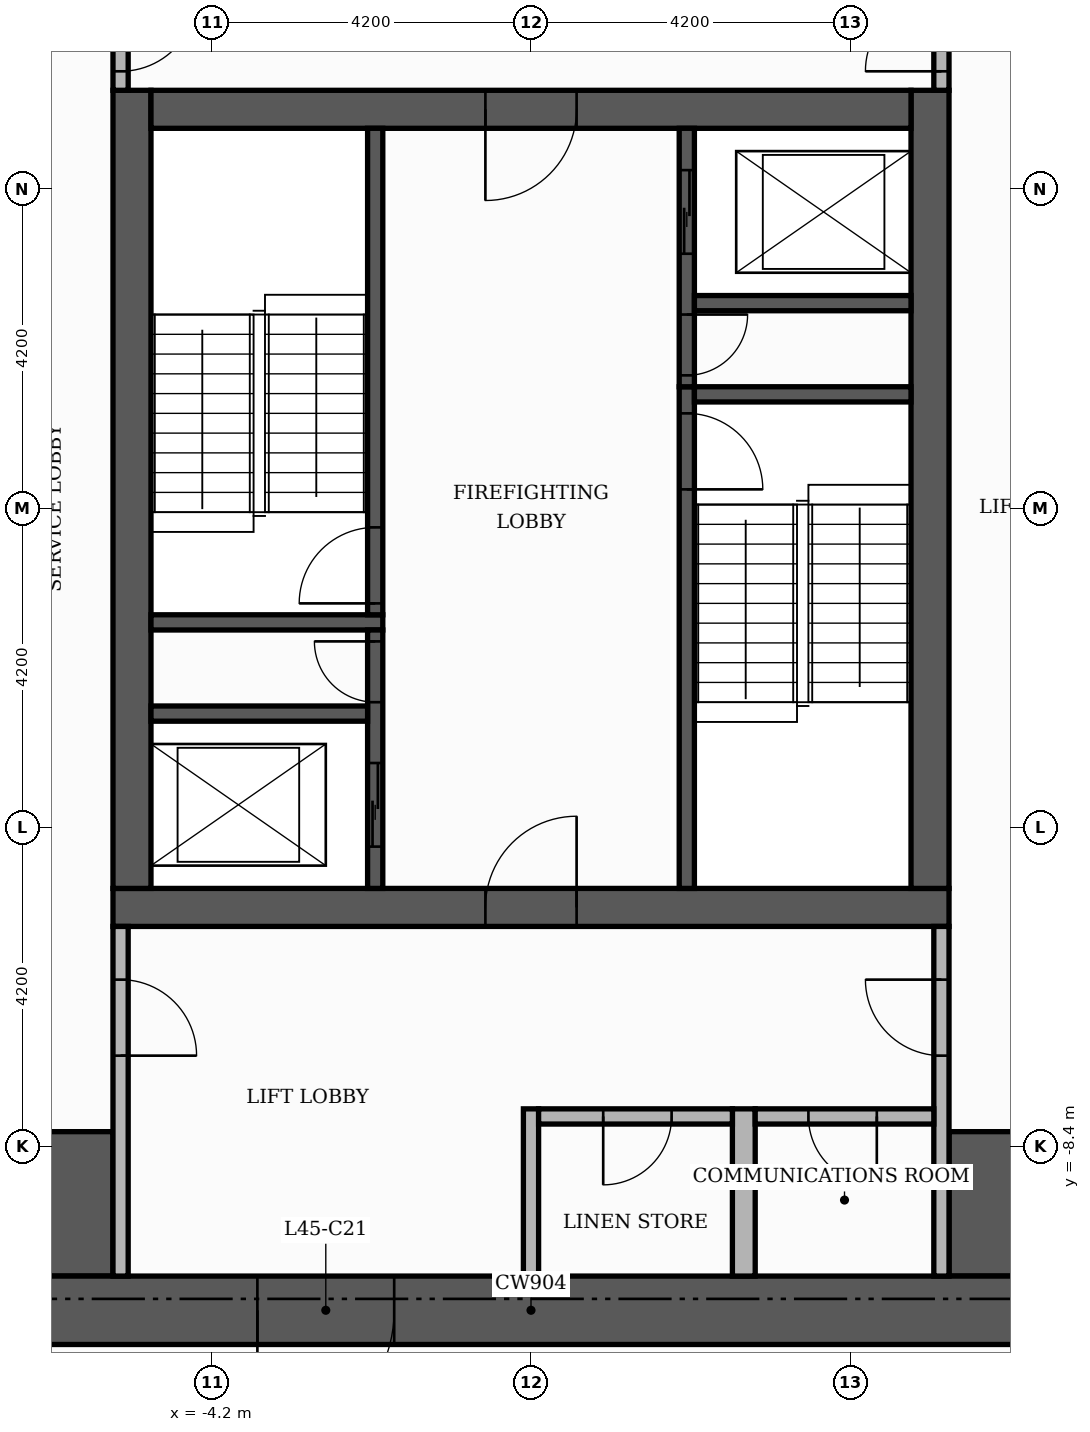
"""IFC4 building model, lengths in metres.
Left out: names, types, materials, properties, quantities, classifications, styles, units other than length and angle.
Written with IfcOpenShell. Run it as: python <this file> out.ifc"""

import sys

from ifc_helpers import new_model, si_unit, direction, frame, frame_2d, origin, place, context, subcontext, project, spatial, rectangle, extrude, element, fill, save


model = new_model("IFC4")
c1 = context("Model", 3, precision=1e-05, world=origin(), true_north=direction((0.0, 1.0)))
c2 = subcontext(c1, "Body", "Model", "MODEL_VIEW")
j1 = project(units=[si_unit("LENGTHUNIT", "METRE"), si_unit("PLANEANGLEUNIT", "RADIAN")], contexts=[c1])
p1 = place(None, origin())
s1 = spatial("IfcSite", under=j1, at=p1, CompositionType="ELEMENT")
p2 = place(p1, origin())
s2 = spatial("IfcBuilding", under=s1, at=p2, CompositionType="ELEMENT")
p3 = place(p2, frame((0.0, 0.0, 192.3)))
s3 = spatial("IfcBuildingStorey", under=s2, at=p3, CompositionType="ELEMENT", Elevation=192.3)
p4 = place(p3, frame((-5.5, -5.25, 0.0), z_axis=(0.0, 0.0, 1.0), x_axis=(1.0, 0.0, 0.0)))
e1 = element("IfcWall", 1, at=p4, inside=s3, PredefinedType="SHEAR", context=c2, shape_type="SweptSolid", body=[
    extrude(rectangle(XDim=11.0, YDim=0.5, at=frame_2d((5.5, 0.0))), origin(), (0.0, 0.0, 1.0), 3.48),
])
p5 = place(p4, frame((4.9, 0.0, 0.0)))
e2 = element("IfcOpeningElement", 2, at=p5, cuts=e1, PredefinedType="OPENING", context=c2, shape_type="SweptSolid", body=[
    extrude(rectangle(XDim=1.2, YDim=2.1, at=frame_2d((0.6, 1.05))), frame((0.0, 0.26, 0.0), z_axis=(0.0, -1.0, 0.0), x_axis=(1.0, 0.0, 0.0)), (0.0, 0.0, 1.0), 0.52),
])
for number, where, z_axis, x_axis in (
    (3, (-5.25, -5.0, 0.0), (0.0, 0.0, 1.0), (0.0, 1.0, 0.0)),
    (4, (5.25, -5.0, 0.0), (0.0, 0.0, 1.0), (0.0, 1.0, 0.0)),
):
    element("IfcWall", number, at=place(p3, frame(where, z_axis=z_axis, x_axis=x_axis)), inside=s3, PredefinedType="SHEAR", context=c2, shape_type="SweptSolid", body=[
        extrude(rectangle(XDim=10.5, YDim=0.5, at=frame_2d((5.25, 0.0))), origin(), (0.0, 0.0, 1.0), 3.48),
    ])
p6 = place(p3, frame((-5.0, 5.25, 0.0), z_axis=(0.0, 0.0, 1.0), x_axis=(1.0, 0.0, 0.0)))
e5 = element("IfcWall", 5, at=p6, inside=s3, PredefinedType="SHEAR", context=c2, shape_type="SweptSolid", body=[
    extrude(rectangle(XDim=10.0, YDim=0.5, at=frame_2d((5.0, 0.0))), origin(), (0.0, 0.0, 1.0), 3.48),
])
p7 = place(p6, frame((4.4, 0.0, 0.0)))
e6 = element("IfcOpeningElement", 6, at=p7, cuts=e5, PredefinedType="OPENING", context=c2, shape_type="SweptSolid", body=[
    extrude(rectangle(XDim=1.2, YDim=2.1, at=frame_2d((0.6, 1.05))), frame((0.0, 0.26, 0.0), z_axis=(0.0, -1.0, 0.0), x_axis=(1.0, 0.0, 0.0)), (0.0, 0.0, 1.0), 0.52),
])
for number, where, z_axis, x_axis in (
    (7, (-10.1, -9.15, 0.0), (0.0, 0.0, 1.0), (1.0, 0.0, 0.0)),
    (8, (5.5, -9.15, 0.0), (0.0, 0.0, 1.0), (1.0, 0.0, 0.0)),
):
    element("IfcWall", number, at=place(p3, frame(where, z_axis=z_axis, x_axis=x_axis)), inside=s3, PredefinedType="SHEAR", context=c2, shape_type="SweptSolid", body=[
        extrude(rectangle(XDim=4.6, YDim=1.9, at=frame_2d((2.3, 0.0))), origin(), (0.0, 0.0, 1.0), 3.48),
    ])
p8 = place(p3, frame((2.05, -5.0, 0.0), z_axis=(0.0, 0.0, 1.0), x_axis=(0.0, 1.0, 0.0)))
e9 = element("IfcWall", 9, at=p8, inside=s3, PredefinedType="SHEAR", context=c2, shape_type="SweptSolid", body=[
    extrude(rectangle(XDim=6.6, YDim=0.2, at=frame_2d((3.3, 0.0))), origin(), (0.0, 0.0, 1.0), 3.48),
])
p9 = place(p8, frame((5.25, 0.0, 0.0)))
e10 = element("IfcOpeningElement", 10, at=p9, cuts=e9, PredefinedType="OPENING", context=c2, shape_type="SweptSolid", body=[
    extrude(rectangle(XDim=1.0, YDim=2.1, at=frame_2d((0.5, 1.05))), frame((0.0, 0.11, 0.0), z_axis=(0.0, -1.0, 0.0), x_axis=(1.0, 0.0, 0.0)), (0.0, 0.0, 1.0), 0.22),
])
p10 = place(p3, frame((-5.0, -1.5, 0.0), z_axis=(0.0, 0.0, 1.0), x_axis=(1.0, 0.0, 0.0)))
e11 = element("IfcWall", 11, at=p10, inside=s3, PredefinedType="SHEAR", context=c2, shape_type="SweptSolid", body=[
    extrude(rectangle(XDim=3.05, YDim=0.2, at=frame_2d((1.525, 0.0))), origin(), (0.0, 0.0, 1.0), 3.48),
])
p11 = place(p3, frame((-2.05, -1.4, 0.0), z_axis=(0.0, 0.0, 1.0), x_axis=(0.0, 1.0, 0.0)))
e12 = element("IfcWall", 12, at=p11, inside=s3, PredefinedType="SHEAR", context=c2, shape_type="SweptSolid", body=[
    extrude(rectangle(XDim=6.4, YDim=0.2, at=frame_2d((3.2, 0.0))), origin(), (0.0, 0.0, 1.0), 3.48),
])
p12 = place(p11, frame((0.15, 0.0, 0.0)))
e13 = element("IfcOpeningElement", 13, at=p12, cuts=e12, PredefinedType="OPENING", context=c2, shape_type="SweptSolid", body=[
    extrude(rectangle(XDim=1.0, YDim=2.1, at=frame_2d((0.5, 1.05))), frame((0.0, 0.11, 0.0), z_axis=(0.0, -1.0, 0.0), x_axis=(1.0, 0.0, 0.0)), (0.0, 0.0, 1.0), 0.22),
])
p13 = place(p3, frame((2.15, 1.5, 0.0), z_axis=(0.0, 0.0, 1.0), x_axis=(1.0, 0.0, 0.0)))
e14 = element("IfcWall", 14, at=p13, inside=s3, PredefinedType="SHEAR", context=c2, shape_type="SweptSolid", body=[
    extrude(rectangle(XDim=2.85, YDim=0.2, at=frame_2d((1.425, 0.0))), origin(), (0.0, 0.0, 1.0), 3.48),
])
p14 = place(p3, frame((-2.05, -5.0, 0.0), z_axis=(0.0, 0.0, 1.0), x_axis=(0.0, 1.0, 0.0)))
e15 = element("IfcWall", 15, at=p14, inside=s3, PredefinedType="SHEAR", context=c2, shape_type="SweptSolid", body=[
    extrude(rectangle(XDim=3.4, YDim=0.2, at=frame_2d((1.7, 0.0))), origin(), (0.0, 0.0, 1.0), 3.48),
])
p15 = place(p14, frame((0.55, 0.0, 0.0)))
e16 = element("IfcOpeningElement", 16, at=p15, cuts=e15, PredefinedType="OPENING", context=c2, shape_type="SweptSolid", body=[
    extrude(rectangle(XDim=1.1, YDim=2.1, at=frame_2d((0.55, 1.05))), frame((0.0, 0.11, 0.0), z_axis=(0.0, -1.0, 0.0), x_axis=(1.0, 0.0, 0.0)), (0.0, 0.0, 1.0), 0.22),
])
p16 = place(p14, frame((2.45, 0.0, 0.0)))
e17 = element("IfcOpeningElement", 17, at=p16, cuts=e15, PredefinedType="OPENING", context=c2, shape_type="SweptSolid", body=[
    extrude(rectangle(XDim=0.8, YDim=2.1, at=frame_2d((0.4, 1.05))), frame((0.0, 0.11, 0.0), z_axis=(0.0, -1.0, 0.0), x_axis=(1.0, 0.0, 0.0)), (0.0, 0.0, 1.0), 0.22),
])
p17 = place(p3, frame((-5.0, -2.7, 0.0), z_axis=(0.0, 0.0, 1.0), x_axis=(1.0, 0.0, 0.0)))
e18 = element("IfcWall", 18, at=p17, inside=s3, PredefinedType="SHEAR", context=c2, shape_type="SweptSolid", body=[
    extrude(rectangle(XDim=2.85, YDim=0.2, at=frame_2d((1.425, 0.0))), origin(), (0.0, 0.0, 1.0), 3.48),
])
p18 = place(p3, frame((2.05, 1.6, 0.0), z_axis=(0.0, 0.0, 1.0), x_axis=(0.0, 1.0, 0.0)))
e19 = element("IfcWall", 19, at=p18, inside=s3, PredefinedType="SHEAR", context=c2, shape_type="SweptSolid", body=[
    extrude(rectangle(XDim=3.4, YDim=0.2, at=frame_2d((1.7, 0.0))), origin(), (0.0, 0.0, 1.0), 3.48),
])
p19 = place(p18, frame((1.75, 0.0, 0.0)))
e20 = element("IfcOpeningElement", 20, at=p19, cuts=e19, PredefinedType="OPENING", context=c2, shape_type="SweptSolid", body=[
    extrude(rectangle(XDim=1.1, YDim=2.1, at=frame_2d((0.55, 1.05))), frame((0.0, 0.11, 0.0), z_axis=(0.0, -1.0, 0.0), x_axis=(1.0, 0.0, 0.0)), (0.0, 0.0, 1.0), 0.22),
])
p20 = place(p18, frame((0.15, 0.0, 0.0)))
e21 = element("IfcOpeningElement", 21, at=p20, cuts=e19, PredefinedType="OPENING", context=c2, shape_type="SweptSolid", body=[
    extrude(rectangle(XDim=0.8, YDim=2.1, at=frame_2d((0.4, 1.05))), frame((0.0, 0.11, 0.0), z_axis=(0.0, -1.0, 0.0), x_axis=(1.0, 0.0, 0.0)), (0.0, 0.0, 1.0), 0.22),
])
p21 = place(p3, frame((2.15, 2.7, 0.0), z_axis=(0.0, 0.0, 1.0), x_axis=(1.0, 0.0, 0.0)))
e22 = element("IfcWall", 22, at=p21, inside=s3, PredefinedType="SHEAR", context=c2, shape_type="SweptSolid", body=[
    extrude(rectangle(XDim=2.85, YDim=0.2, at=frame_2d((1.425, 0.0))), origin(), (0.0, 0.0, 1.0), 3.48),
])
p22 = place(p3, frame((-11.0, -10.55, 0.0), z_axis=(0.0, 0.0, 1.0), x_axis=(1.0, 0.0, 0.0)))
e23 = element("IfcWall", 23, at=p22, inside=s3, PredefinedType="SHEAR", context=c2, shape_type="SweptSolid", body=[
    extrude(rectangle(XDim=22.0, YDim=0.9, at=frame_2d((11.0, 0.0))), origin(), (0.0, 0.0, 1.0), 3.48),
])
p23 = place(p22, frame((7.4, 0.0, 0.0)))
e24 = element("IfcOpeningElement", 24, at=p23, cuts=e23, PredefinedType="OPENING", context=c2, shape_type="SweptSolid", body=[
    extrude(rectangle(XDim=1.8, YDim=2.2, at=frame_2d((0.9, 1.1))), frame((0.0, 0.46, 0.0), z_axis=(0.0, -1.0, 0.0), x_axis=(1.0, 0.0, 0.0)), (0.0, 0.0, 1.0), 0.92),
])
p24 = place(p3, frame((-5.4, -10.1, 0.0), z_axis=(0.0, 0.0, 1.0), x_axis=(0.0, 1.0, 0.0)))
e25 = element("IfcWall", 25, at=p24, inside=s3, PredefinedType="PARTITIONING", context=c2, shape_type="SweptSolid", body=[
    extrude(rectangle(XDim=4.6, YDim=0.2, at=frame_2d((2.3, 0.0))), origin(), (0.0, 0.0, 1.0), 3.48),
])
p25 = place(p24, frame((2.9, 0.0, 0.0)))
e26 = element("IfcOpeningElement", 26, at=p25, cuts=e25, PredefinedType="OPENING", context=c2, shape_type="SweptSolid", body=[
    extrude(rectangle(XDim=1.0, YDim=2.1, at=frame_2d((0.5, 1.05))), frame((0.0, 0.11, 0.0), z_axis=(0.0, -1.0, 0.0), x_axis=(1.0, 0.0, 0.0)), (0.0, 0.0, 1.0), 0.22),
])
p26 = place(p3, frame((0.0, -10.1, 0.0), z_axis=(0.0, 0.0, 1.0), x_axis=(0.0, 1.0, 0.0)))
e27 = element("IfcWall", 27, at=p26, inside=s3, PredefinedType="PARTITIONING", context=c2, shape_type="SweptSolid", body=[
    extrude(rectangle(XDim=2.2, YDim=0.2, at=frame_2d((1.1, 0.0))), origin(), (0.0, 0.0, 1.0), 3.48),
])
p27 = place(p3, frame((2.8, -10.1, 0.0), z_axis=(0.0, 0.0, 1.0), x_axis=(0.0, 1.0, 0.0)))
e28 = element("IfcWall", 28, at=p27, inside=s3, PredefinedType="PARTITIONING", context=c2, shape_type="SweptSolid", body=[
    extrude(rectangle(XDim=2.2, YDim=0.3, at=frame_2d((1.1, 0.0))), origin(), (0.0, 0.0, 1.0), 3.48),
])
p28 = place(p3, frame((5.4, -10.1, 0.0), z_axis=(0.0, 0.0, 1.0), x_axis=(0.0, 1.0, 0.0)))
e29 = element("IfcWall", 29, at=p28, inside=s3, PredefinedType="PARTITIONING", context=c2, shape_type="SweptSolid", body=[
    extrude(rectangle(XDim=4.6, YDim=0.2, at=frame_2d((2.3, 0.0))), origin(), (0.0, 0.0, 1.0), 3.48),
])
p29 = place(p28, frame((2.9, 0.0, 0.0)))
e30 = element("IfcOpeningElement", 30, at=p29, cuts=e29, PredefinedType="OPENING", context=c2, shape_type="SweptSolid", body=[
    extrude(rectangle(XDim=1.0, YDim=2.1, at=frame_2d((0.5, 1.05))), frame((0.0, 0.11, 0.0), z_axis=(0.0, -1.0, 0.0), x_axis=(1.0, 0.0, 0.0)), (0.0, 0.0, 1.0), 0.22),
])
p30 = place(p3, frame((0.1, -8.0, 0.0), z_axis=(0.0, 0.0, 1.0), x_axis=(1.0, 0.0, 0.0)))
e31 = element("IfcWall", 31, at=p30, inside=s3, PredefinedType="PARTITIONING", context=c2, shape_type="SweptSolid", body=[
    extrude(rectangle(XDim=2.55, YDim=0.2, at=frame_2d((1.275, 0.0))), origin(), (0.0, 0.0, 1.0), 3.48),
])
p31 = place(p30, frame((0.85, 0.0, 0.0)))
e32 = element("IfcOpeningElement", 32, at=p31, cuts=e31, PredefinedType="OPENING", context=c2, shape_type="SweptSolid", body=[
    extrude(rectangle(XDim=0.9, YDim=2.1, at=frame_2d((0.45, 1.05))), frame((0.0, 0.11, 0.0), z_axis=(0.0, -1.0, 0.0), x_axis=(1.0, 0.0, 0.0)), (0.0, 0.0, 1.0), 0.22),
])
p32 = place(p3, frame((2.95, -8.0, 0.0), z_axis=(0.0, 0.0, 1.0), x_axis=(1.0, 0.0, 0.0)))
e33 = element("IfcWall", 33, at=p32, inside=s3, PredefinedType="PARTITIONING", context=c2, shape_type="SweptSolid", body=[
    extrude(rectangle(XDim=2.35, YDim=0.2, at=frame_2d((1.175, 0.0))), origin(), (0.0, 0.0, 1.0), 3.48),
])
p33 = place(p32, frame((0.7, 0.0, 0.0)))
e34 = element("IfcOpeningElement", 34, at=p33, cuts=e33, PredefinedType="OPENING", context=c2, shape_type="SweptSolid", body=[
    extrude(rectangle(XDim=0.9, YDim=2.1, at=frame_2d((0.45, 1.05))), frame((0.0, 0.11, 0.0), z_axis=(0.0, -1.0, 0.0), x_axis=(1.0, 0.0, 0.0)), (0.0, 0.0, 1.0), 0.22),
])
p34 = place(p3, frame((-5.4, 5.5, 0.0), z_axis=(0.0, 0.0, 1.0), x_axis=(0.0, 1.0, 0.0)))
e35 = element("IfcWall", 35, at=p34, inside=s3, PredefinedType="PARTITIONING", context=c2, shape_type="SweptSolid", body=[
    extrude(rectangle(XDim=1.55, YDim=0.2, at=frame_2d((0.775, 0.0))), origin(), (0.0, 0.0, 1.0), 3.48),
])
p35 = place(p34, frame((0.25, 0.0, 0.0)))
e36 = element("IfcOpeningElement", 36, at=p35, cuts=e35, PredefinedType="OPENING", context=c2, shape_type="SweptSolid", body=[
    extrude(rectangle(XDim=1.0, YDim=2.1, at=frame_2d((0.5, 1.05))), frame((0.0, 0.11, 0.0), z_axis=(0.0, -1.0, 0.0), x_axis=(1.0, 0.0, 0.0)), (0.0, 0.0, 1.0), 0.22),
])
p36 = place(p3, frame((5.4, 5.5, 0.0), z_axis=(0.0, 0.0, 1.0), x_axis=(0.0, 1.0, 0.0)))
e37 = element("IfcWall", 37, at=p36, inside=s3, PredefinedType="PARTITIONING", context=c2, shape_type="SweptSolid", body=[
    extrude(rectangle(XDim=4.6, YDim=0.2, at=frame_2d((2.3, 0.0))), origin(), (0.0, 0.0, 1.0), 3.48),
])
p37 = place(p36, frame((0.25, 0.0, 0.0)))
e38 = element("IfcOpeningElement", 38, at=p37, cuts=e37, PredefinedType="OPENING", context=c2, shape_type="SweptSolid", body=[
    extrude(rectangle(XDim=1.0, YDim=2.1, at=frame_2d((0.5, 1.05))), frame((0.0, 0.11, 0.0), z_axis=(0.0, -1.0, 0.0), x_axis=(1.0, 0.0, 0.0)), (0.0, 0.0, 1.0), 0.22),
])
p38 = place(p19, origin())
e39 = element("IfcDoor", 39, at=p38, inside=s3, OperationType="SLIDING_TO_LEFT", PredefinedType="DOOR", context=c2, shape_type="SweptSolid", body=[
    extrude(rectangle(XDim=1.1, YDim=2.1, at=frame_2d((0.55, 1.05))), frame((0.0, 0.025, 0.0), z_axis=(0.0, -1.0, 0.0), x_axis=(1.0, 0.0, 0.0)), (0.0, 0.0, 1.0), 0.05),
])
fill(e20, e39)
p39 = place(p15, origin())
e40 = element("IfcDoor", 40, at=p39, inside=s3, OperationType="SLIDING_TO_LEFT", PredefinedType="DOOR", context=c2, shape_type="SweptSolid", body=[
    extrude(rectangle(XDim=1.1, YDim=2.1, at=frame_2d((0.55, 1.05))), frame((0.0, 0.025, 0.0), z_axis=(0.0, -1.0, 0.0), x_axis=(1.0, 0.0, 0.0)), (0.0, 0.0, 1.0), 0.05),
])
fill(e16, e40)
p40 = place(p12, origin())
e41 = element("IfcDoor", 41, at=p40, inside=s3, OperationType="SINGLE_SWING_LEFT", PredefinedType="DOOR", context=c2, shape_type="SweptSolid", body=[
    extrude(rectangle(XDim=1.0, YDim=2.1, at=frame_2d((0.5, 1.05))), frame((0.0, 0.025, 0.0), z_axis=(0.0, -1.0, 0.0), x_axis=(1.0, 0.0, 0.0)), (0.0, 0.0, 1.0), 0.05),
])
fill(e13, e41)
p41 = place(p9, frame((1.0, 0.0, 0.0), z_axis=(0.0, 0.0, 1.0), x_axis=(-1.0, 0.0, 0.0)))
e42 = element("IfcDoor", 42, at=p41, inside=s3, OperationType="SINGLE_SWING_LEFT", PredefinedType="DOOR", context=c2, shape_type="SweptSolid", body=[
    extrude(rectangle(XDim=1.0, YDim=2.1, at=frame_2d((0.5, 1.05))), frame((0.0, 0.025, 0.0), z_axis=(0.0, -1.0, 0.0), x_axis=(1.0, 0.0, 0.0)), (0.0, 0.0, 1.0), 0.05),
])
fill(e10, e42)
p42 = place(p20, frame((0.8, 0.0, 0.0), z_axis=(0.0, 0.0, 1.0), x_axis=(-1.0, 0.0, 0.0)))
e43 = element("IfcDoor", 43, at=p42, inside=s3, OperationType="SINGLE_SWING_RIGHT", PredefinedType="DOOR", context=c2, shape_type="SweptSolid", body=[
    extrude(rectangle(XDim=0.8, YDim=2.1, at=frame_2d((0.4, 1.05))), frame((0.0, 0.025, 0.0), z_axis=(0.0, -1.0, 0.0), x_axis=(1.0, 0.0, 0.0)), (0.0, 0.0, 1.0), 0.05),
])
fill(e21, e43)
p43 = place(p16, origin())
e44 = element("IfcDoor", 44, at=p43, inside=s3, OperationType="SINGLE_SWING_RIGHT", PredefinedType="DOOR", context=c2, shape_type="SweptSolid", body=[
    extrude(rectangle(XDim=0.8, YDim=2.1, at=frame_2d((0.4, 1.05))), frame((0.0, 0.025, 0.0), z_axis=(0.0, -1.0, 0.0), x_axis=(1.0, 0.0, 0.0)), (0.0, 0.0, 1.0), 0.05),
])
fill(e17, e44)
p44 = place(p7, frame((1.2, 0.0, 0.0), z_axis=(0.0, 0.0, 1.0), x_axis=(-1.0, 0.0, 0.0)))
e45 = element("IfcDoor", 45, at=p44, inside=s3, OperationType="SINGLE_SWING_LEFT", PredefinedType="DOOR", context=c2, shape_type="SweptSolid", body=[
    extrude(rectangle(XDim=1.2, YDim=2.1, at=frame_2d((0.6, 1.05))), frame((0.0, 0.025, 0.0), z_axis=(0.0, -1.0, 0.0), x_axis=(1.0, 0.0, 0.0)), (0.0, 0.0, 1.0), 0.05),
])
fill(e6, e45)
p45 = place(p5, origin())
e46 = element("IfcDoor", 46, at=p45, inside=s3, OperationType="SINGLE_SWING_RIGHT", PredefinedType="DOOR", context=c2, shape_type="SweptSolid", body=[
    extrude(rectangle(XDim=1.2, YDim=2.1, at=frame_2d((0.6, 1.05))), frame((0.0, 0.025, 0.0), z_axis=(0.0, -1.0, 0.0), x_axis=(1.0, 0.0, 0.0)), (0.0, 0.0, 1.0), 0.05),
])
fill(e2, e46)
p46 = place(p35, frame((1.0, 0.0, 0.0), z_axis=(0.0, 0.0, 1.0), x_axis=(-1.0, 0.0, 0.0)))
e47 = element("IfcDoor", 47, at=p46, inside=s3, OperationType="SINGLE_SWING_RIGHT", PredefinedType="DOOR", context=c2, shape_type="SweptSolid", body=[
    extrude(rectangle(XDim=1.0, YDim=2.1, at=frame_2d((0.5, 1.05))), frame((0.0, 0.025, 0.0), z_axis=(0.0, -1.0, 0.0), x_axis=(1.0, 0.0, 0.0)), (0.0, 0.0, 1.0), 0.05),
])
fill(e36, e47)
p47 = place(p37, origin())
e48 = element("IfcDoor", 48, at=p47, inside=s3, OperationType="SINGLE_SWING_LEFT", PredefinedType="DOOR", context=c2, shape_type="SweptSolid", body=[
    extrude(rectangle(XDim=1.0, YDim=2.1, at=frame_2d((0.5, 1.05))), frame((0.0, 0.025, 0.0), z_axis=(0.0, -1.0, 0.0), x_axis=(1.0, 0.0, 0.0)), (0.0, 0.0, 1.0), 0.05),
])
fill(e38, e48)
p48 = place(p25, frame((1.0, 0.0, 0.0), z_axis=(0.0, 0.0, 1.0), x_axis=(-1.0, 0.0, 0.0)))
e49 = element("IfcDoor", 49, at=p48, inside=s3, OperationType="SINGLE_SWING_LEFT", PredefinedType="DOOR", context=c2, shape_type="SweptSolid", body=[
    extrude(rectangle(XDim=1.0, YDim=2.1, at=frame_2d((0.5, 1.05))), frame((0.0, 0.025, 0.0), z_axis=(0.0, -1.0, 0.0), x_axis=(1.0, 0.0, 0.0)), (0.0, 0.0, 1.0), 0.05),
])
fill(e26, e49)
p49 = place(p29, origin())
e50 = element("IfcDoor", 50, at=p49, inside=s3, OperationType="SINGLE_SWING_RIGHT", PredefinedType="DOOR", context=c2, shape_type="SweptSolid", body=[
    extrude(rectangle(XDim=1.0, YDim=2.1, at=frame_2d((0.5, 1.05))), frame((0.0, 0.025, 0.0), z_axis=(0.0, -1.0, 0.0), x_axis=(1.0, 0.0, 0.0)), (0.0, 0.0, 1.0), 0.05),
])
fill(e30, e50)
p50 = place(p23, frame((1.8, 0.0, 0.0), z_axis=(0.0, 0.0, 1.0), x_axis=(-1.0, 0.0, 0.0)))
e51 = element("IfcDoor", 51, at=p50, inside=s3, OperationType="DOUBLE_DOOR_SINGLE_SWING", PredefinedType="DOOR", context=c2, shape_type="SweptSolid", body=[
    extrude(rectangle(XDim=1.8, YDim=2.2, at=frame_2d((0.9, 1.1))), frame((0.0, 0.025, 0.0), z_axis=(0.0, -1.0, 0.0), x_axis=(1.0, 0.0, 0.0)), (0.0, 0.0, 1.0), 0.05),
])
fill(e24, e51)
p51 = place(p31, frame((0.9, 0.0, 0.0), z_axis=(0.0, 0.0, 1.0), x_axis=(-1.0, 0.0, 0.0)))
e52 = element("IfcDoor", 52, at=p51, inside=s3, OperationType="SINGLE_SWING_LEFT", PredefinedType="DOOR", context=c2, shape_type="SweptSolid", body=[
    extrude(rectangle(XDim=0.9, YDim=2.1, at=frame_2d((0.45, 1.05))), frame((0.0, 0.025, 0.0), z_axis=(0.0, -1.0, 0.0), x_axis=(1.0, 0.0, 0.0)), (0.0, 0.0, 1.0), 0.05),
])
fill(e32, e52)
p52 = place(p33, frame((0.9, 0.0, 0.0), z_axis=(0.0, 0.0, 1.0), x_axis=(-1.0, 0.0, 0.0)))
e53 = element("IfcDoor", 53, at=p52, inside=s3, OperationType="SINGLE_SWING_RIGHT", PredefinedType="DOOR", context=c2, shape_type="SweptSolid", body=[
    extrude(rectangle(XDim=0.9, YDim=2.1, at=frame_2d((0.45, 1.05))), frame((0.0, 0.025, 0.0), z_axis=(0.0, -1.0, 0.0), x_axis=(1.0, 0.0, 0.0)), (0.0, 0.0, 1.0), 0.05),
])
fill(e34, e53)
save(model, sys.argv[1])
